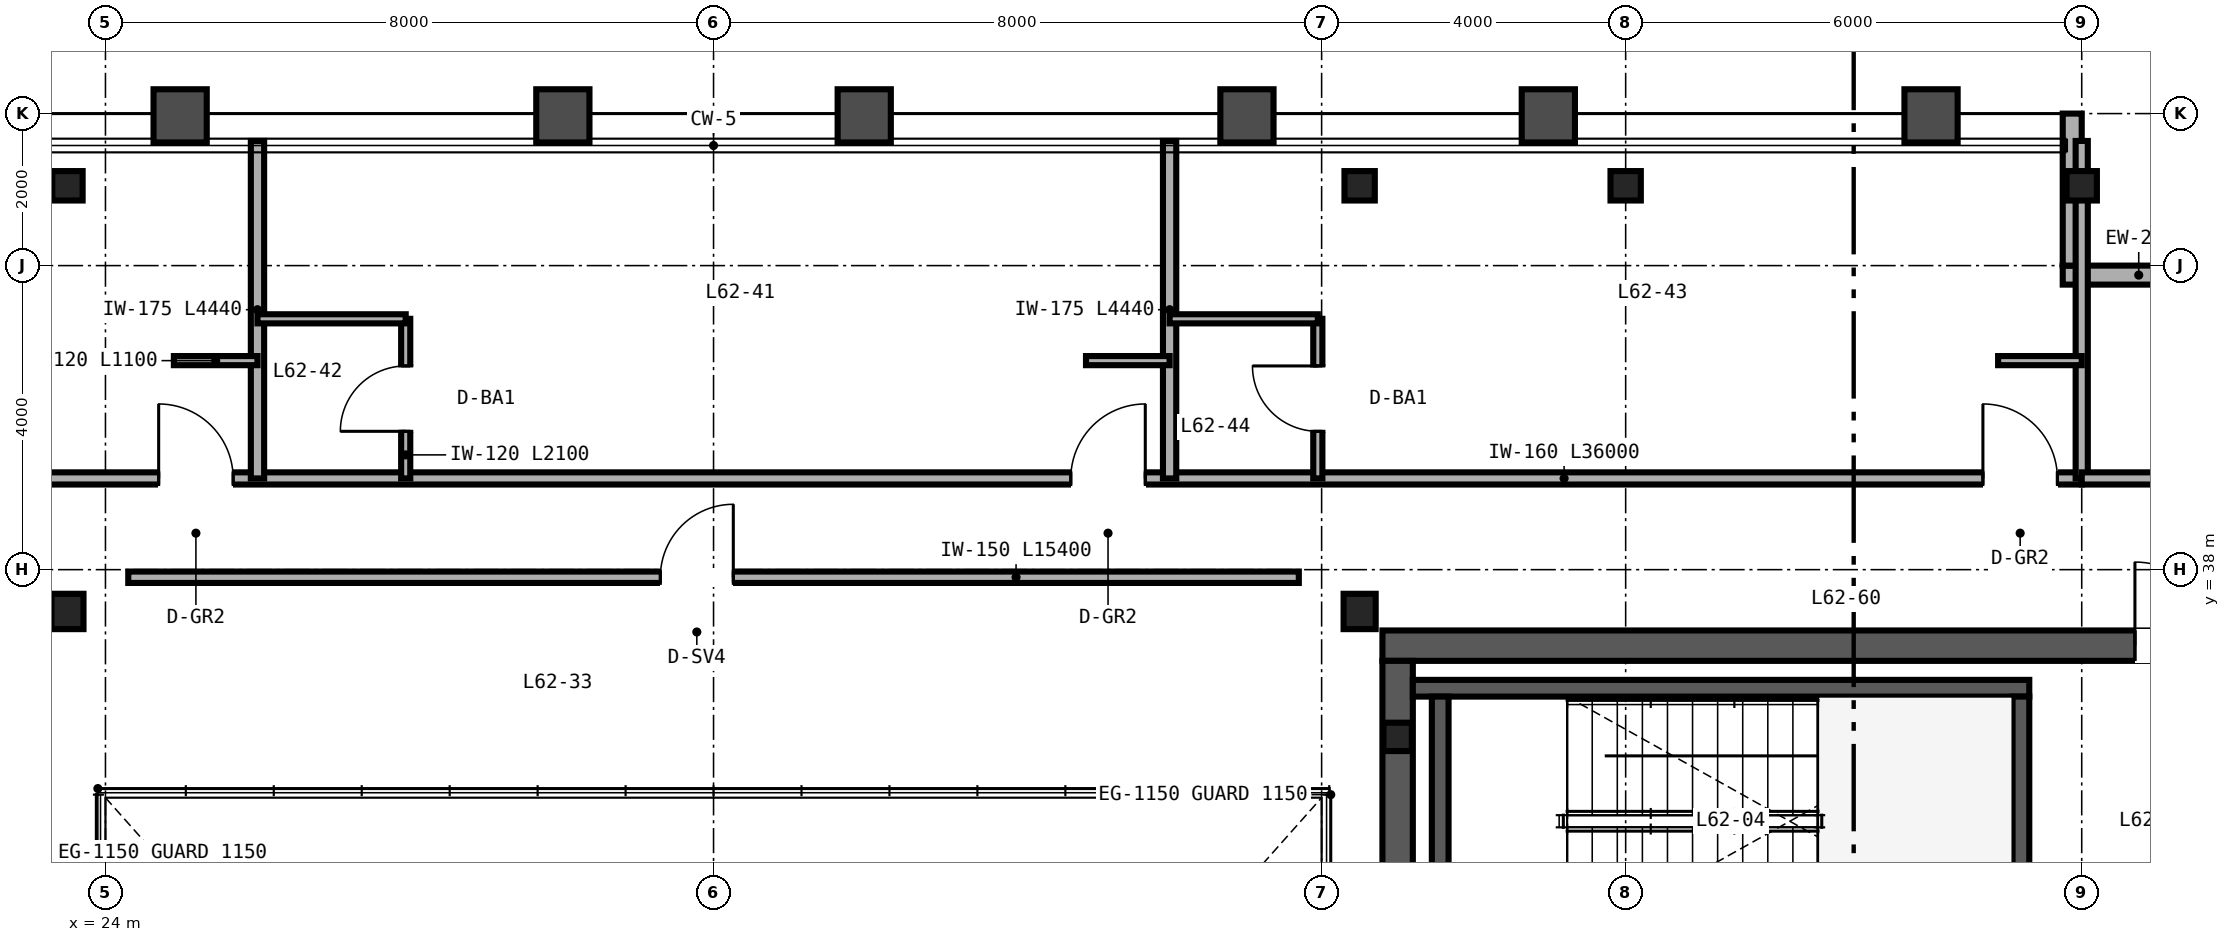
"""IFC4 building model, lengths in metres.
Left out: names, types, materials, properties, quantities, classifications, styles, units other than length and angle.
Written with IfcOpenShell. Run it as: python <this file> out.ifc"""

import sys

from ifc_helpers import new_model, si_unit, direction, frame, frame_2d, origin, origin_2d, place, context, subcontext, project, spatial, rectangle, i_section, extrude, source, transform, mapped, element, fill, save


model = new_model("IFC4")
c1 = context("Model", 3, precision=1e-05, world=origin(), true_north=direction((0.0, 1.0)))
c2 = subcontext(c1, "Body", "Model", "MODEL_VIEW")
j1 = project(units=[si_unit("LENGTHUNIT", "METRE"), si_unit("PLANEANGLEUNIT", "RADIAN")], contexts=[c1])
p1 = place(None, origin())
s1 = spatial("IfcSite", under=j1, at=p1, CompositionType="ELEMENT")
p2 = place(p1, origin())
s2 = spatial("IfcBuilding", under=s1, at=p2, CompositionType="ELEMENT")
p3 = place(p2, frame((0.0, 0.0, 247.2)))
s3 = spatial("IfcBuildingStorey", under=s2, at=p3, CompositionType="ELEMENT", Elevation=247.2)
m1 = source(origin(), c2, "Body", "SweptSolid", [
    extrude(i_section(OverallWidth=0.374, OverallDepth=0.373, WebThickness=0.016, FlangeThickness=0.026, FilletRadius=0.025, at=origin_2d()), origin(), (0.0, 0.0, 1.0), 3.6),
])
p4 = place(p3, frame((41.0, 35.8, 0.0), z_axis=(0.0, 0.0, 1.0), x_axis=(1.0, 0.0, 0.0)))
e1 = element("IfcColumn", 1, at=p4, inside=s3, PredefinedType="COLUMN", context=c2, shape_type="MappedRepresentation", body=[
    mapped(m1, transform((0.0, 0.0, 0.0), scale=1.0)),
])
p5 = place(p3, frame((40.8, 37.0, 0.0), z_axis=(0.0, 0.0, 1.0), x_axis=(1.0, 0.0, 0.0)))
e2 = element("IfcWall", 2, at=p5, inside=s3, PredefinedType="SHEAR", context=c2, shape_type="SweptSolid", body=[
    extrude(rectangle(XDim=12.4, YDim=0.4, at=frame_2d((6.2, 0.0))), origin(), (0.0, 0.0, 1.0), 3.38),
])
p6 = place(p5, frame((9.9, 0.0, 0.0)))
e3 = element("IfcOpeningElement", 3, at=p6, cuts=e2, PredefinedType="OPENING", context=c2, shape_type="SweptSolid", body=[
    extrude(rectangle(XDim=1.1, YDim=2.15, at=frame_2d((0.55, 1.075))), frame((0.0, 0.21, 0.0), z_axis=(0.0, -1.0, 0.0), x_axis=(1.0, 0.0, 0.0)), (0.0, 0.0, 1.0), 0.42),
])
p7 = place(p3, frame((41.0, 15.2, 0.0), z_axis=(0.0, 0.0, 1.0), x_axis=(0.0, 1.0, 0.0)))
e4 = element("IfcWall", 4, at=p7, inside=s3, PredefinedType="SHEAR", context=c2, shape_type="SweptSolid", body=[
    extrude(rectangle(XDim=21.6, YDim=0.4, at=frame_2d((10.8, 0.0))), origin(), (0.0, 0.0, 1.0), 3.38),
])
p8 = place(p3, frame((41.2, 36.44, 0.0), z_axis=(0.0, 0.0, 1.0), x_axis=(1.0, 0.0, 0.0)))
e5 = element("IfcWall", 5, at=p8, inside=s3, PredefinedType="SHEAR", context=c2, shape_type="SweptSolid", body=[
    extrude(rectangle(XDim=8.11, YDim=0.22, at=frame_2d((4.055, 0.0))), origin(), (0.0, 0.0, 1.0), 3.4),
])
for number, where, z_axis, x_axis in (
    (6, (41.56, 33.05, 0.0), (0.0, 0.0, 1.0), (0.0, 1.0, 0.0)),
    (7, (49.2, 33.05, 0.0), (0.0, 0.0, 1.0), (0.0, 1.0, 0.0)),
):
    element("IfcWall", number, at=place(p3, frame(where, z_axis=z_axis, x_axis=x_axis)), inside=s3, PredefinedType="SHEAR", context=c2, shape_type="SweptSolid", body=[
        extrude(rectangle(XDim=3.28, YDim=0.22, at=frame_2d((1.64, 0.0))), origin(), (0.0, 0.0, 1.0), 3.4),
    ])
m2 = source(origin(), c2, "Body", "SweptSolid", [
    extrude(i_section(OverallWidth=0.422, OverallDepth=0.465, WebThickness=0.045, FlangeThickness=0.073, FilletRadius=0.025, at=origin_2d()), origin(), (0.0, 0.0, 1.0), 3.38),
])
for number, where, z_axis, x_axis in (
    (8, (23.5, 37.45, 0.0), (0.0, 0.0, 1.0), (1.0, 0.0, 0.0)),
    (9, (40.5, 37.45, 0.0), (0.0, 0.0, 1.0), (1.0, 0.0, 0.0)),
):
    element("IfcColumn", number, at=place(p3, frame(where, z_axis=z_axis, x_axis=x_axis)), inside=s3, PredefinedType="COLUMN", context=c2, shape_type="MappedRepresentation", body=[
        mapped(m2, transform((0.0, 0.0, 0.0), scale=1.0)),
    ])
m3 = source(origin(), c2, "Body", "SweptSolid", [
    extrude(i_section(OverallWidth=0.399, OverallDepth=0.387, WebThickness=0.021, FlangeThickness=0.033, FilletRadius=0.025, at=origin_2d()), origin(), (0.0, 0.0, 1.0), 3.38),
])
for number, where, z_axis, x_axis in (
    (10, (23.5, 43.05, 0.0), (0.0, 0.0, 1.0), (1.0, 0.0, 0.0)),
    (11, (40.5, 43.05, 0.0), (0.0, 0.0, 1.0), (1.0, 0.0, 0.0)),
    (12, (44.0, 43.05, 0.0), (0.0, 0.0, 1.0), (1.0, 0.0, 0.0)),
    (13, (50.0, 43.05, 0.0), (0.0, 0.0, 1.0), (1.0, 0.0, 0.0)),
):
    element("IfcColumn", number, at=place(p3, frame(where, z_axis=z_axis, x_axis=x_axis)), inside=s3, PredefinedType="COLUMN", context=c2, shape_type="MappedRepresentation", body=[
        mapped(m3, transform((0.0, 0.0, 0.0), scale=1.0)),
    ])
p9 = place(p3, frame((51.75, 41.875, 0.0), z_axis=(0.0, 0.0, 1.0), x_axis=(-1.0, 0.0, 0.0)))
e14 = element("IfcWall", 14, at=p9, inside=s3, PredefinedType="SOLIDWALL", context=c2, shape_type="SweptSolid", body=[
    extrude(rectangle(XDim=2.0, YDim=0.25, at=frame_2d((1.0, 0.0))), origin(), (0.0, 0.0, 1.0), 3.38),
])
p10 = place(p3, frame((49.875, 42.0, 0.0), z_axis=(0.0, 0.0, 1.0), x_axis=(0.0, 1.0, 0.0)))
e15 = element("IfcWall", 15, at=p10, inside=s3, PredefinedType="SOLIDWALL", context=c2, shape_type="SweptSolid", body=[
    extrude(rectangle(XDim=2.0, YDim=0.25, at=frame_2d((1.0, 0.0))), origin(), (0.0, 0.0, 1.0), 2.687),
])
p11 = place(p3, frame((24.3, 37.9, 0.0), z_axis=(0.0, 0.0, 1.0), x_axis=(1.0, 0.0, 0.0)))
e16 = element("IfcWall", 16, at=p11, inside=s3, PredefinedType="PARTITIONING", context=c2, shape_type="SweptSolid", body=[
    extrude(rectangle(XDim=15.4, YDim=0.15, at=frame_2d((7.7, 0.0))), origin(), (0.0, 0.0, 1.0), 3.38),
])
p12 = place(p11, frame((7.0, 0.0, 0.0)))
e17 = element("IfcOpeningElement", 17, at=p12, cuts=e16, PredefinedType="OPENING", context=c2, shape_type="SweptSolid", body=[
    extrude(rectangle(XDim=0.96, YDim=2.15, at=frame_2d((0.48, 1.075))), frame((0.0, 0.085, 0.0), z_axis=(0.0, -1.0, 0.0), x_axis=(1.0, 0.0, 0.0)), (0.0, 0.0, 1.0), 0.17),
])
p13 = place(p3, frame((14.0, 39.2, 0.0), z_axis=(0.0, 0.0, 1.0), x_axis=(1.0, 0.0, 0.0)))
e18 = element("IfcWall", 18, at=p13, inside=s3, PredefinedType="PARTITIONING", context=c2, shape_type="SweptSolid", body=[
    extrude(rectangle(XDim=36.0, YDim=0.16, at=frame_2d((18.0, 0.0))), origin(), (0.0, 0.0, 1.0), 2.923),
])
p14 = place(p13, frame((10.7, 0.0, 0.0)))
e19 = element("IfcOpeningElement", 19, at=p14, cuts=e18, PredefinedType="OPENING", context=c2, shape_type="SweptSolid", body=[
    extrude(rectangle(XDim=0.98, YDim=2.2, at=frame_2d((0.49, 1.1))), frame((0.0, 0.09, 0.0), z_axis=(0.0, -1.0, 0.0), x_axis=(1.0, 0.0, 0.0)), (0.0, 0.0, 1.0), 0.18),
])
p15 = place(p13, frame((22.7, 0.0, 0.0)))
e20 = element("IfcOpeningElement", 20, at=p15, cuts=e18, PredefinedType="OPENING", context=c2, shape_type="SweptSolid", body=[
    extrude(rectangle(XDim=0.98, YDim=2.2, at=frame_2d((0.49, 1.1))), frame((0.0, 0.09, 0.0), z_axis=(0.0, -1.0, 0.0), x_axis=(1.0, 0.0, 0.0)), (0.0, 0.0, 1.0), 0.18),
])
p16 = place(p13, frame((34.7, 0.0, 0.0)))
e21 = element("IfcOpeningElement", 21, at=p16, cuts=e18, PredefinedType="OPENING", context=c2, shape_type="SweptSolid", body=[
    extrude(rectangle(XDim=0.98, YDim=2.2, at=frame_2d((0.49, 1.1))), frame((0.0, 0.09, 0.0), z_axis=(0.0, -1.0, 0.0), x_axis=(1.0, 0.0, 0.0)), (0.0, 0.0, 1.0), 0.18),
])
p17 = place(p3, frame((50.0, 39.2, 0.0), z_axis=(0.0, 0.0, 1.0), x_axis=(0.0, 1.0, 0.0)))
e22 = element("IfcWall", 22, at=p17, inside=s3, PredefinedType="PARTITIONING", context=c2, shape_type="SweptSolid", body=[
    extrude(rectangle(XDim=4.44, YDim=0.16, at=frame_2d((2.22, 0.0))), origin(), (0.0, 0.0, 1.0), 2.687),
])
p18 = place(p3, frame((26.0, 39.2, 0.0), z_axis=(0.0, 0.0, 1.0), x_axis=(0.0, 1.0, 0.0)))
e23 = element("IfcWall", 23, at=p18, inside=s3, PredefinedType="PARTITIONING", context=c2, shape_type="SweptSolid", body=[
    extrude(rectangle(XDim=4.44, YDim=0.175, at=frame_2d((2.22, 0.0))), origin(), (0.0, 0.0, 1.0), 2.432),
])
p19 = place(p3, frame((24.9, 40.75, 0.0), z_axis=(0.0, 0.0, 1.0), x_axis=(1.0, 0.0, 0.0)))
e24 = element("IfcWall", 24, at=p19, inside=s3, PredefinedType="PARTITIONING", context=c2, shape_type="SweptSolid", body=[
    extrude(rectangle(XDim=1.1, YDim=0.12, at=frame_2d((0.55, 0.0))), origin(), (0.0, 0.0, 1.0), 3.38),
])
p20 = place(p3, frame((38.0, 39.2, 0.0), z_axis=(0.0, 0.0, 1.0), x_axis=(0.0, 1.0, 0.0)))
e25 = element("IfcWall", 25, at=p20, inside=s3, PredefinedType="PARTITIONING", context=c2, shape_type="SweptSolid", body=[
    extrude(rectangle(XDim=4.44, YDim=0.175, at=frame_2d((2.22, 0.0))), origin(), (0.0, 0.0, 1.0), 2.432),
])
p21 = place(p3, frame((27.95, 39.2, 0.0), z_axis=(0.0, 0.0, 1.0), x_axis=(0.0, 1.0, 0.0)))
e26 = element("IfcWall", 26, at=p21, inside=s3, PredefinedType="PARTITIONING", context=c2, shape_type="SweptSolid", body=[
    extrude(rectangle(XDim=2.1, YDim=0.12, at=frame_2d((1.05, 0.0))), origin(), (0.0, 0.0, 1.0), 3.38),
])
p22 = place(p21, frame((0.62, 0.0, 0.0)))
e27 = element("IfcOpeningElement", 27, at=p22, cuts=e26, PredefinedType="OPENING", context=c2, shape_type="SweptSolid", body=[
    extrude(rectangle(XDim=0.86, YDim=2.1, at=frame_2d((0.43, 1.05))), frame((0.0, 0.07, 0.0), z_axis=(0.0, -1.0, 0.0), x_axis=(1.0, 0.0, 0.0)), (0.0, 0.0, 1.0), 0.14),
])
p23 = place(p3, frame((26.0, 41.3, 0.0), z_axis=(0.0, 0.0, 1.0), x_axis=(1.0, 0.0, 0.0)))
e28 = element("IfcWall", 28, at=p23, inside=s3, PredefinedType="PARTITIONING", context=c2, shape_type="SweptSolid", body=[
    extrude(rectangle(XDim=1.95, YDim=0.12, at=frame_2d((0.975, 0.0))), origin(), (0.0, 0.0, 1.0), 3.38),
])
p24 = place(p3, frame((36.9, 40.75, 0.0), z_axis=(0.0, 0.0, 1.0), x_axis=(1.0, 0.0, 0.0)))
e29 = element("IfcWall", 29, at=p24, inside=s3, PredefinedType="PARTITIONING", context=c2, shape_type="SweptSolid", body=[
    extrude(rectangle(XDim=1.1, YDim=0.12, at=frame_2d((0.55, 0.0))), origin(), (0.0, 0.0, 1.0), 3.38),
])
p25 = place(p3, frame((39.95, 39.2, 0.0), z_axis=(0.0, 0.0, 1.0), x_axis=(0.0, 1.0, 0.0)))
e30 = element("IfcWall", 30, at=p25, inside=s3, PredefinedType="PARTITIONING", context=c2, shape_type="SweptSolid", body=[
    extrude(rectangle(XDim=2.1, YDim=0.12, at=frame_2d((1.05, 0.0))), origin(), (0.0, 0.0, 1.0), 3.38),
])
p26 = place(p25, frame((0.62, 0.0, 0.0)))
e31 = element("IfcOpeningElement", 31, at=p26, cuts=e30, PredefinedType="OPENING", context=c2, shape_type="SweptSolid", body=[
    extrude(rectangle(XDim=0.86, YDim=2.1, at=frame_2d((0.43, 1.05))), frame((0.0, 0.07, 0.0), z_axis=(0.0, -1.0, 0.0), x_axis=(1.0, 0.0, 0.0)), (0.0, 0.0, 1.0), 0.14),
])
p27 = place(p3, frame((38.0, 41.3, 0.0), z_axis=(0.0, 0.0, 1.0), x_axis=(1.0, 0.0, 0.0)))
e32 = element("IfcWall", 32, at=p27, inside=s3, PredefinedType="PARTITIONING", context=c2, shape_type="SweptSolid", body=[
    extrude(rectangle(XDim=1.95, YDim=0.12, at=frame_2d((0.975, 0.0))), origin(), (0.0, 0.0, 1.0), 3.38),
])
p28 = place(p3, frame((48.9, 40.75, 0.0), z_axis=(0.0, 0.0, 1.0), x_axis=(1.0, 0.0, 0.0)))
e33 = element("IfcWall", 33, at=p28, inside=s3, PredefinedType="PARTITIONING", context=c2, shape_type="SweptSolid", body=[
    extrude(rectangle(XDim=1.1, YDim=0.12, at=frame_2d((0.55, 0.0))), origin(), (0.0, 0.0, 1.0), 3.38),
])
p29 = place(p3, frame((50.0, 39.2, 0.0), z_axis=(0.0, 0.0, 1.0), x_axis=(1.0, 0.0, 0.0)))
e34 = element("IfcWall", 34, at=p29, inside=s3, PredefinedType="PARTITIONING", context=c2, shape_type="SweptSolid", body=[
    extrude(rectangle(XDim=4.0, YDim=0.16, at=frame_2d((2.0, 0.0))), origin(), (0.0, 0.0, 1.0), 3.38),
])
p30 = place(p29, frame((1.52, 0.0, 0.0)))
e35 = element("IfcOpeningElement", 35, at=p30, cuts=e34, PredefinedType="OPENING", context=c2, shape_type="SweptSolid", body=[
    extrude(rectangle(XDim=0.96, YDim=2.15, at=frame_2d((0.48, 1.075))), frame((0.0, 0.09, 0.0), z_axis=(0.0, -1.0, 0.0), x_axis=(1.0, 0.0, 0.0)), (0.0, 0.0, 1.0), 0.18),
])
m4 = source(origin(), c2, "Body", "SweptSolid", [
    extrude(rectangle(XDim=1.1, YDim=2.15, at=frame_2d((0.55, 1.075))), frame((0.0, 0.025, 0.0), z_axis=(0.0, -1.0, 0.0), x_axis=(1.0, 0.0, 0.0)), (0.0, 0.0, 1.0), 0.05),
])
p31 = place(p6, origin())
e36 = element("IfcDoor", 36, at=p31, inside=s3, OperationType="SINGLE_SWING_LEFT", PredefinedType="DOOR", context=c2, shape_type="MappedRepresentation", body=[
    mapped(m4, transform((0.0, 0.0, 0.0), scale=1.0)),
])
fill(e3, e36)
m5 = source(origin(), c2, "Body", "SweptSolid", [
    extrude(rectangle(XDim=0.96, YDim=2.15, at=frame_2d((0.48, 1.075))), frame((0.0, 0.025, 0.0), z_axis=(0.0, -1.0, 0.0), x_axis=(1.0, 0.0, 0.0)), (0.0, 0.0, 1.0), 0.05),
])
p32 = place(p12, origin())
e37 = element("IfcDoor", 37, at=p32, inside=s3, OperationType="SINGLE_SWING_RIGHT", PredefinedType="DOOR", context=c2, shape_type="MappedRepresentation", body=[
    mapped(m5, transform((0.0, 0.0, 0.0), scale=1.0)),
])
fill(e17, e37)
m6 = source(origin(), c2, "Body", "SweptSolid", [
    extrude(rectangle(XDim=0.86, YDim=2.1, at=frame_2d((0.43, 1.05))), frame((0.0, 0.025, 0.0), z_axis=(0.0, -1.0, 0.0), x_axis=(1.0, 0.0, 0.0)), (0.0, 0.0, 1.0), 0.05),
])
p33 = place(p22, origin())
e38 = element("IfcDoor", 38, at=p33, inside=s3, OperationType="SINGLE_SWING_LEFT", PredefinedType="DOOR", context=c2, shape_type="MappedRepresentation", body=[
    mapped(m6, transform((0.0, 0.0, 0.0), scale=1.0)),
])
fill(e27, e38)
p34 = place(p26, origin())
e39 = element("IfcDoor", 39, at=p34, inside=s3, OperationType="SINGLE_SWING_RIGHT", PredefinedType="DOOR", context=c2, shape_type="MappedRepresentation", body=[
    mapped(m6, transform((0.0, 0.0, 0.0), scale=1.0)),
])
fill(e31, e39)
m7 = source(origin(), c2, "Body", "SweptSolid", [
    extrude(rectangle(XDim=0.98, YDim=2.2, at=frame_2d((0.49, 1.1))), frame((0.0, 0.025, 0.0), z_axis=(0.0, -1.0, 0.0), x_axis=(1.0, 0.0, 0.0)), (0.0, 0.0, 1.0), 0.05),
])
p35 = place(p14, origin())
e40 = element("IfcDoor", 40, at=p35, inside=s3, OperationType="SINGLE_SWING_LEFT", PredefinedType="DOOR", context=c2, shape_type="MappedRepresentation", body=[
    mapped(m7, transform((0.0, 0.0, 0.0), scale=1.0)),
])
fill(e19, e40)
p36 = place(p15, origin())
e41 = element("IfcDoor", 41, at=p36, inside=s3, OperationType="SINGLE_SWING_RIGHT", PredefinedType="DOOR", context=c2, shape_type="MappedRepresentation", body=[
    mapped(m7, transform((0.0, 0.0, 0.0), scale=1.0)),
])
fill(e20, e41)
p37 = place(p16, origin())
e42 = element("IfcDoor", 42, at=p37, inside=s3, OperationType="SINGLE_SWING_LEFT", PredefinedType="DOOR", context=c2, shape_type="MappedRepresentation", body=[
    mapped(m7, transform((0.0, 0.0, 0.0), scale=1.0)),
])
fill(e21, e42)
save(model, sys.argv[1])
